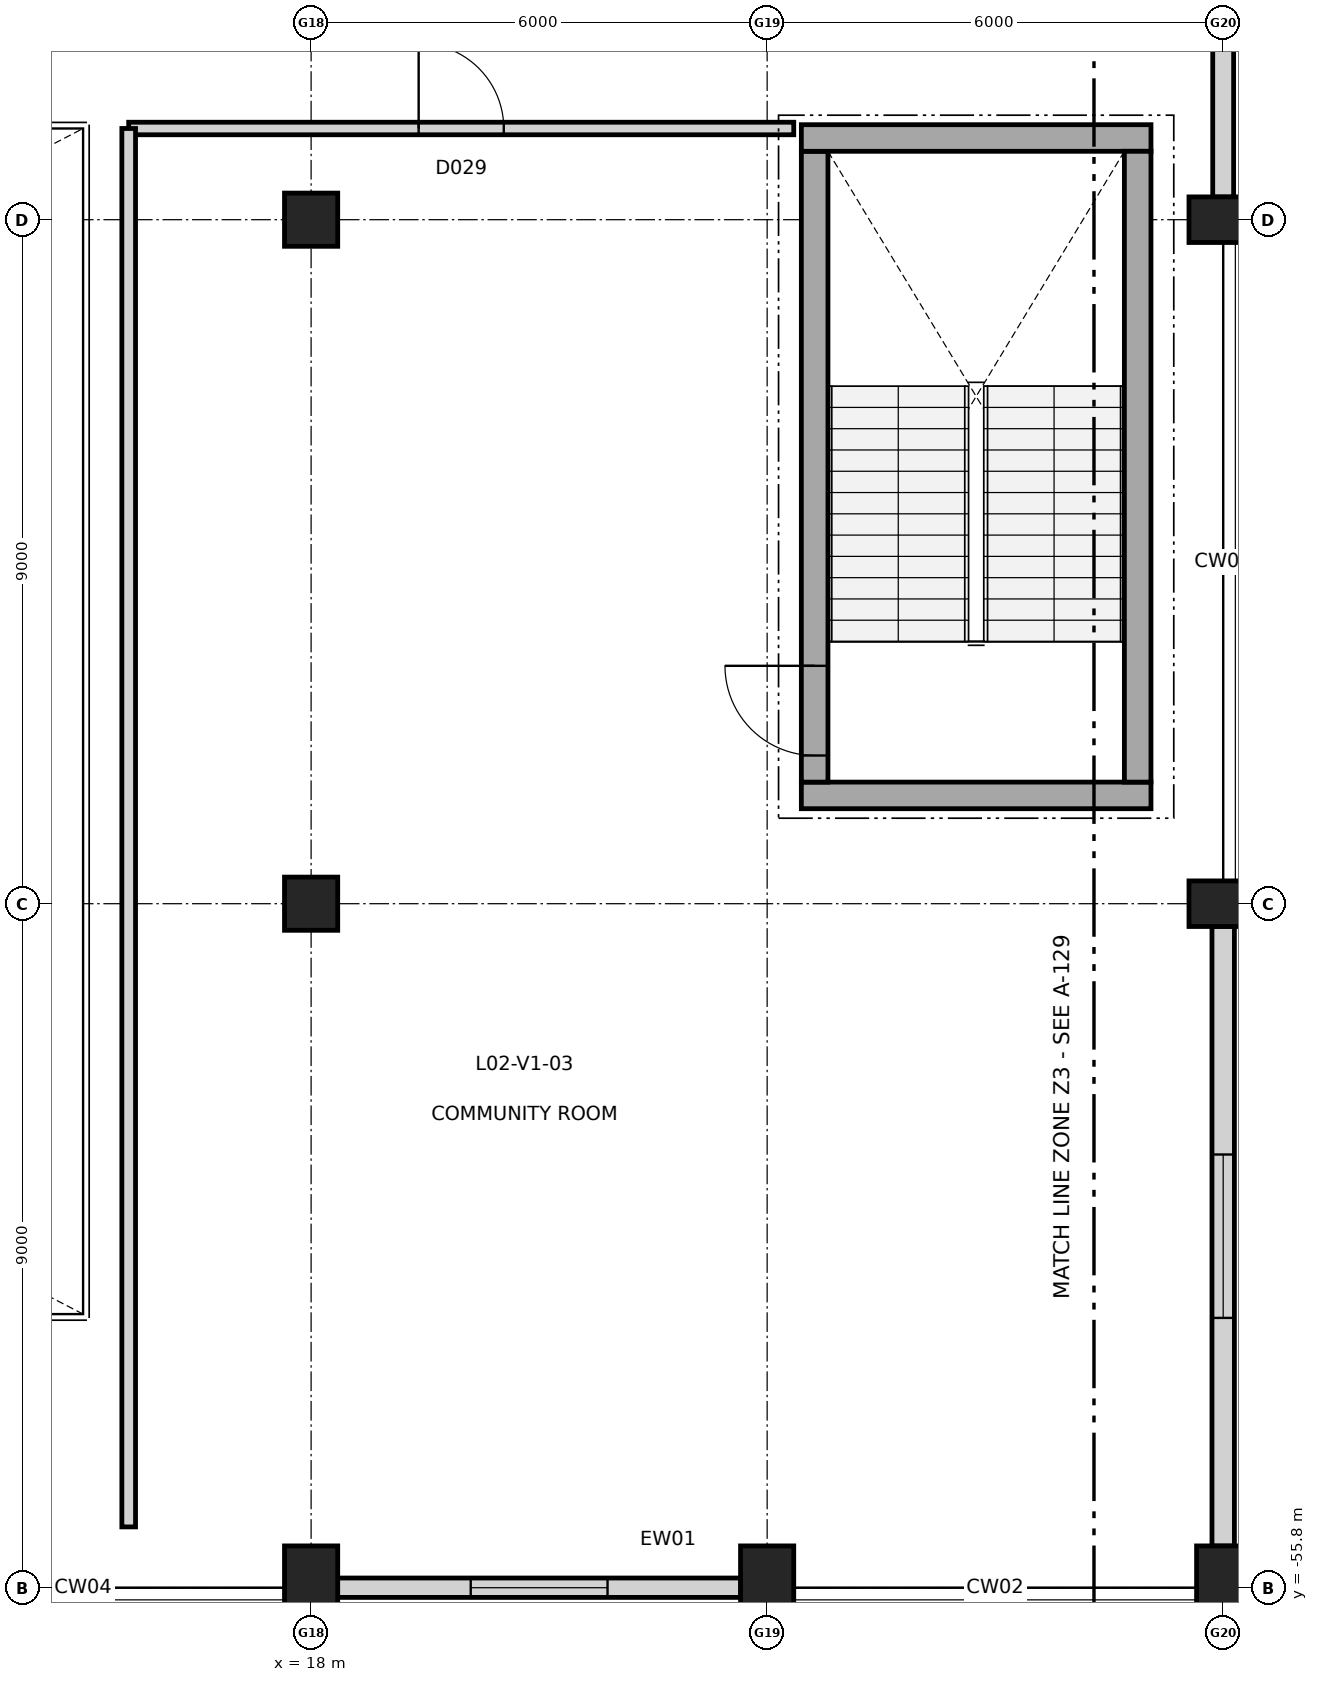
"""IFC4 building model, lengths in metres.
Left out: names, types, materials, properties, quantities, classifications, styles, units other than length and angle.
Written with IfcOpenShell. Run it as: python <this file> out.ifc"""

import sys

from ifc_helpers import new_model, si_unit, direction, frame, frame_2d, origin, origin_2d, place, context, subcontext, project, spatial, rectangle, circle, extrude, element, fill, save


model = new_model("IFC4")
c1 = context("Model", 3, precision=1e-05, world=origin(), true_north=direction((0.0, 1.0)))
c2 = subcontext(c1, "Body", "Model", "MODEL_VIEW")
j1 = project(units=[si_unit("LENGTHUNIT", "METRE"), si_unit("PLANEANGLEUNIT", "RADIAN")], contexts=[c1])
p1 = place(None, origin())
s1 = spatial("IfcSite", under=j1, at=p1, CompositionType="ELEMENT")
p2 = place(p1, origin())
s2 = spatial("IfcBuilding", under=s1, at=p2, CompositionType="ELEMENT")
p3 = place(p2, frame((0.0, 0.0, 10.2)))
s3 = spatial("IfcBuildingStorey", under=s2, at=p3, CompositionType="ELEMENT", Elevation=10.2)
p4 = place(p3, frame((18.0, -55.8, 0.0), z_axis=(0.0, 0.0, 1.0), x_axis=(1.0, 0.0, 0.0)))
e1 = element("IfcColumn", 1, at=p4, inside=s3, PredefinedType="COLUMN", context=c2, shape_type="SweptSolid", body=[
    extrude(rectangle(XDim=0.7, YDim=1.1, at=origin_2d()), origin(), (0.0, 0.0, 1.0), 4.8),
])
for number, where, z_axis, x_axis in (
    (2, (18.0, -46.8, 0.0), (0.0, 0.0, 1.0), (1.0, 0.0, 0.0)),
    (3, (18.0, -37.8, 0.0), (0.0, 0.0, 1.0), (1.0, 0.0, 0.0)),
):
    element("IfcColumn", number, at=place(p3, frame(where, z_axis=z_axis, x_axis=x_axis)), inside=s3, PredefinedType="COLUMN", context=c2, shape_type="SweptSolid", body=[
        extrude(circle(Radius=0.35, at=origin_2d()), origin(), (0.0, 0.0, 1.0), 4.8),
    ])
for number, where, z_axis, x_axis in (
    (4, (24.0, -55.8, 0.0), (0.0, 0.0, 1.0), (1.0, 0.0, 0.0)),
    (5, (30.0, -55.8, 0.0), (0.0, 0.0, 1.0), (1.0, 0.0, 0.0)),
):
    element("IfcColumn", number, at=place(p3, frame(where, z_axis=z_axis, x_axis=x_axis)), inside=s3, PredefinedType="COLUMN", context=c2, shape_type="SweptSolid", body=[
        extrude(rectangle(XDim=0.7, YDim=1.1, at=origin_2d()), origin(), (0.0, 0.0, 1.0), 4.8),
    ])
for number, where, z_axis, x_axis in (
    (6, (30.0, -46.8, 0.0), (0.0, 0.0, 1.0), (0.0, 1.0, 0.0)),
    (7, (30.0, -37.8, 0.0), (0.0, 0.0, 1.0), (0.0, 1.0, 0.0)),
):
    element("IfcColumn", number, at=place(p3, frame(where, z_axis=z_axis, x_axis=x_axis)), inside=s3, PredefinedType="COLUMN", context=c2, shape_type="SweptSolid", body=[
        extrude(rectangle(XDim=0.6, YDim=0.9, at=origin_2d()), origin(), (0.0, 0.0, 1.0), 4.8),
    ])
p5 = place(p3, frame((23.652, -55.8, 0.0), z_axis=(0.0, 0.0, 1.0), x_axis=(-1.0, 0.0, 0.0)))
e8 = element("IfcWall", 8, at=p5, inside=s3, PredefinedType="STANDARD", context=c2, shape_type="SweptSolid", body=[
    extrude(rectangle(XDim=5.304, YDim=0.255, at=frame_2d((2.652, 0.0))), origin(), (0.0, 0.0, 1.0), 3.745),
])
p6 = place(p5, frame((1.752, 0.0, 0.6)))
e9 = element("IfcOpeningElement", 9, at=p6, cuts=e8, PredefinedType="OPENING", context=c2, shape_type="SweptSolid", body=[
    extrude(rectangle(XDim=1.8, YDim=2.35, at=frame_2d((0.9, 1.175))), frame((0.0, 0.137, 0.0), z_axis=(0.0, -1.0, 0.0), x_axis=(1.0, 0.0, 0.0)), (0.0, 0.0, 1.0), 0.275),
])
p7 = place(p3, frame((30.0, -29.098, 0.0), z_axis=(0.0, 0.0, 1.0), x_axis=(0.0, -1.0, 0.0)))
e10 = element("IfcWall", 10, at=p7, inside=s3, PredefinedType="STANDARD", context=c2, shape_type="SweptSolid", body=[
    extrude(rectangle(XDim=8.404, YDim=0.275, at=frame_2d((4.202, 0.0))), origin(), (0.0, 0.0, 1.0), 3.829),
])
p8 = place(p7, frame((3.202, 0.0, 0.85)))
e11 = element("IfcOpeningElement", 11, at=p8, cuts=e10, PredefinedType="OPENING", context=c2, shape_type="SweptSolid", body=[
    extrude(rectangle(XDim=2.0, YDim=1.85, at=frame_2d((1.0, 0.925))), frame((0.0, 0.147, 0.0), z_axis=(0.0, -1.0, 0.0), x_axis=(1.0, 0.0, 0.0)), (0.0, 0.0, 1.0), 0.295),
])
p9 = place(p3, frame((30.0, -47.098, 0.0), z_axis=(0.0, 0.0, 1.0), x_axis=(0.0, -1.0, 0.0)))
e12 = element("IfcWall", 12, at=p9, inside=s3, PredefinedType="STANDARD", context=c2, shape_type="SweptSolid", body=[
    extrude(rectangle(XDim=8.154, YDim=0.295, at=frame_2d((4.077, 0.0))), origin(), (0.0, 0.0, 1.0), 3.829),
])
p10 = place(p9, frame((3.002, 0.0, 0.85)))
e13 = element("IfcOpeningElement", 13, at=p10, cuts=e12, PredefinedType="OPENING", context=c2, shape_type="SweptSolid", body=[
    extrude(rectangle(XDim=2.15, YDim=1.85, at=frame_2d((1.075, 0.925))), frame((0.0, 0.157, 0.0), z_axis=(0.0, -1.0, 0.0), x_axis=(1.0, 0.0, 0.0)), (0.0, 0.0, 1.0), 0.315),
])
p11 = place(p3, frame((29.05, -45.375, 0.0), z_axis=(0.0, 0.0, 1.0), x_axis=(-1.0, 0.0, 0.0)))
e14 = element("IfcWall", 14, at=p11, inside=s3, PredefinedType="SHEAR", context=c2, shape_type="SweptSolid", body=[
    extrude(rectangle(XDim=4.6, YDim=0.35, at=frame_2d((2.3, 0.0))), origin(), (0.0, 0.0, 1.0), 4.8),
])
p12 = place(p3, frame((24.625, -45.2, 0.0), z_axis=(0.0, 0.0, 1.0), x_axis=(0.0, 1.0, 0.0)))
e15 = element("IfcWall", 15, at=p12, inside=s3, PredefinedType="SHEAR", context=c2, shape_type="SweptSolid", body=[
    extrude(rectangle(XDim=8.3, YDim=0.35, at=frame_2d((4.15, 0.0))), origin(), (0.0, 0.0, 1.0), 4.8),
])
p13 = place(p12, frame((0.35, 0.0, 0.0)))
e16 = element("IfcOpeningElement", 16, at=p13, cuts=e15, PredefinedType="OPENING", context=c2, shape_type="SweptSolid", body=[
    extrude(rectangle(XDim=1.18, YDim=2.15, at=frame_2d((0.59, 1.075))), frame((0.0, 0.185, 0.0), z_axis=(0.0, -1.0, 0.0), x_axis=(1.0, 0.0, 0.0)), (0.0, 0.0, 1.0), 0.37),
])
p14 = place(p3, frame((24.45, -36.725, 0.0), z_axis=(0.0, 0.0, 1.0), x_axis=(1.0, 0.0, 0.0)))
e17 = element("IfcWall", 17, at=p14, inside=s3, PredefinedType="SHEAR", context=c2, shape_type="SweptSolid", body=[
    extrude(rectangle(XDim=4.6, YDim=0.35, at=frame_2d((2.3, 0.0))), origin(), (0.0, 0.0, 1.0), 4.8),
])
p15 = place(p3, frame((28.875, -36.9, 0.0), z_axis=(0.0, 0.0, 1.0), x_axis=(0.0, -1.0, 0.0)))
e18 = element("IfcWall", 18, at=p15, inside=s3, PredefinedType="SHEAR", context=c2, shape_type="SweptSolid", body=[
    extrude(rectangle(XDim=8.3, YDim=0.35, at=frame_2d((4.15, 0.0))), origin(), (0.0, 0.0, 1.0), 4.8),
])
p16 = place(p3, frame((15.6, -36.6, 0.0), z_axis=(0.0, 0.0, 1.0), x_axis=(1.0, 0.0, 0.0)))
e19 = element("IfcWall", 19, at=p16, inside=s3, PredefinedType="PARTITIONING", context=c2, shape_type="SweptSolid", body=[
    extrude(rectangle(XDim=8.75, YDim=0.165, at=frame_2d((4.375, 0.0))), origin(), (0.0, 0.0, 1.0), 4.42),
])
p17 = place(p16, frame((3.815, 0.0, 0.0)))
e20 = element("IfcOpeningElement", 20, at=p17, cuts=e19, PredefinedType="OPENING", context=c2, shape_type="SweptSolid", body=[
    extrude(rectangle(XDim=1.12, YDim=2.25, at=frame_2d((0.56, 1.125))), frame((0.0, 0.093, 0.0), z_axis=(0.0, -1.0, 0.0), x_axis=(1.0, 0.0, 0.0)), (0.0, 0.0, 1.0), 0.185),
])
p18 = place(p3, frame((15.6, -55.0, 0.0), z_axis=(0.0, 0.0, 1.0), x_axis=(0.0, 1.0, 0.0)))
e21 = element("IfcWall", 21, at=p18, inside=s3, PredefinedType="PARTITIONING", context=c2, shape_type="SweptSolid", body=[
    extrude(rectangle(XDim=18.4, YDim=0.18, at=frame_2d((9.2, 0.0))), origin(), (0.0, 0.0, 1.0), 4.42),
])
p19 = place(p6, origin())
e22 = element("IfcWindow", 22, at=p19, inside=s3, PartitioningType="SINGLE_PANEL", PredefinedType="WINDOW", context=c2, shape_type="SweptSolid", body=[
    extrude(rectangle(XDim=1.8, YDim=2.35, at=frame_2d((0.9, 1.175))), frame((0.0, 0.03, 0.0), z_axis=(0.0, -1.0, 0.0), x_axis=(1.0, 0.0, 0.0)), (0.0, 0.0, 1.0), 0.06),
])
fill(e9, e22)
p20 = place(p10, origin())
e23 = element("IfcWindow", 23, at=p20, inside=s3, PartitioningType="SINGLE_PANEL", PredefinedType="WINDOW", context=c2, shape_type="SweptSolid", body=[
    extrude(rectangle(XDim=2.15, YDim=1.85, at=frame_2d((1.075, 0.925))), frame((0.0, 0.03, 0.0), z_axis=(0.0, -1.0, 0.0), x_axis=(1.0, 0.0, 0.0)), (0.0, 0.0, 1.0), 0.06),
])
fill(e13, e23)
p21 = place(p13, origin())
e24 = element("IfcDoor", 24, at=p21, inside=s3, OperationType="SINGLE_SWING_RIGHT", PredefinedType="DOOR", context=c2, shape_type="SweptSolid", body=[
    extrude(rectangle(XDim=1.18, YDim=2.15, at=frame_2d((0.59, 1.075))), frame((0.0, 0.025, 0.0), z_axis=(0.0, -1.0, 0.0), x_axis=(1.0, 0.0, 0.0)), (0.0, 0.0, 1.0), 0.05),
])
fill(e16, e24)
p22 = place(p17, origin())
e25 = element("IfcDoor", 25, at=p22, inside=s3, OperationType="SINGLE_SWING_LEFT", PredefinedType="DOOR", context=c2, shape_type="SweptSolid", body=[
    extrude(rectangle(XDim=1.12, YDim=2.25, at=frame_2d((0.56, 1.125))), frame((0.0, 0.025, 0.0), z_axis=(0.0, -1.0, 0.0), x_axis=(1.0, 0.0, 0.0)), (0.0, 0.0, 1.0), 0.05),
])
fill(e20, e25)
save(model, sys.argv[1])
